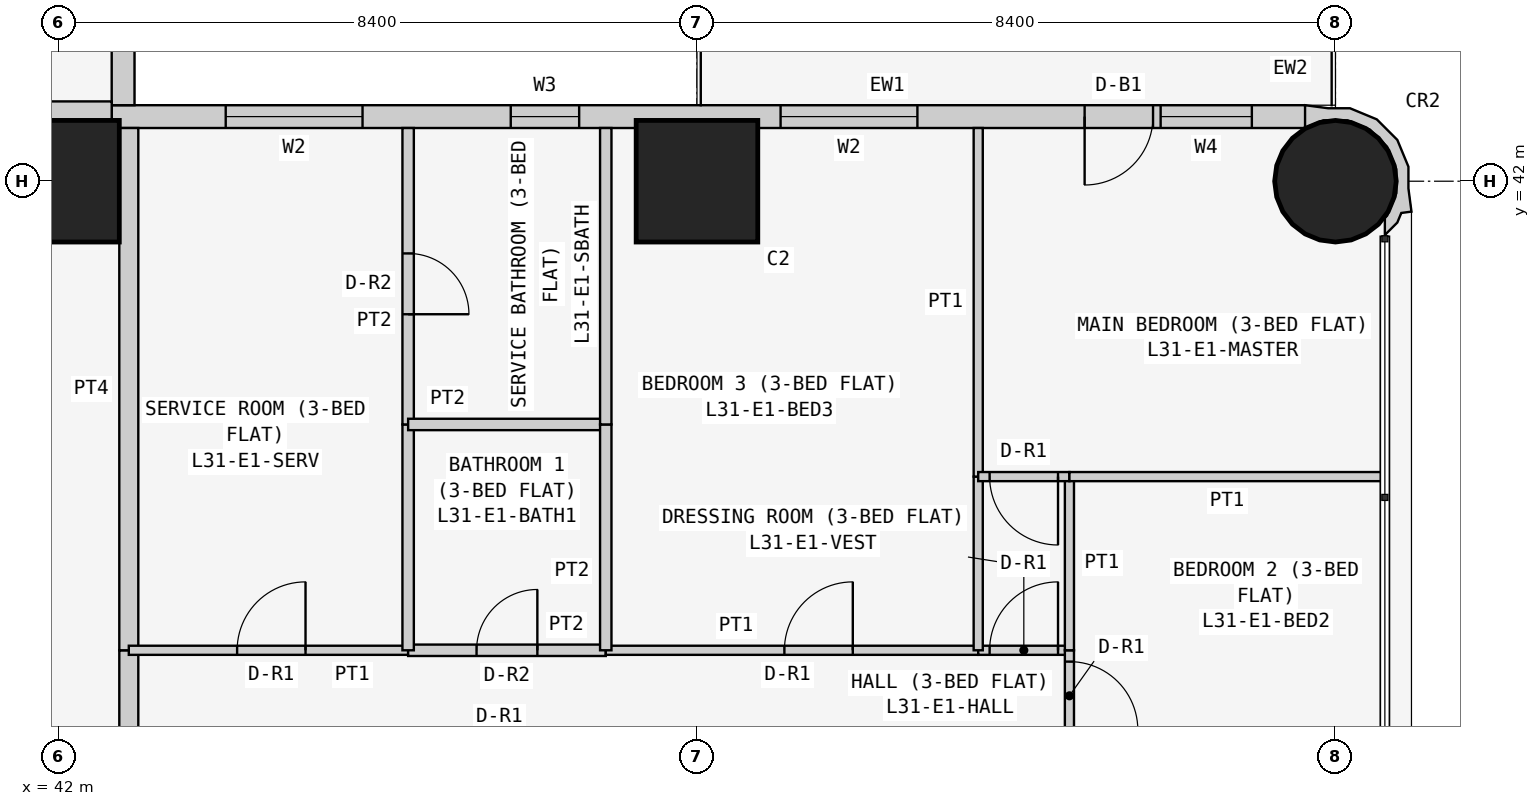
"""IFC4 building model, lengths in metres.
Left out: names, types, materials, properties, quantities, classifications, styles, units other than length and angle.
Written with IfcOpenShell. Run it as: python <this file> out.ifc"""

import sys

from ifc_helpers import new_model, si_unit, direction, frame, frame_2d, origin, origin_2d, place, context, subcontext, project, spatial, polyline, rectangle, circle, outline, extrude, element, fill, save


model = new_model("IFC4")
c1 = context("Model", 3, precision=1e-05, world=origin(), true_north=direction((0.0, 1.0)))
c2 = subcontext(c1, "Body", "Model", "MODEL_VIEW")
j1 = project(units=[si_unit("LENGTHUNIT", "METRE"), si_unit("PLANEANGLEUNIT", "RADIAN")], contexts=[c1])
p1 = place(None, origin())
s1 = spatial("IfcSite", under=j1, at=p1, CompositionType="ELEMENT")
p2 = place(p1, origin())
s2 = spatial("IfcBuilding", under=s1, at=p2, CompositionType="ELEMENT")
p3 = place(p2, frame((0.0, 0.0, 123.3)))
s3 = spatial("IfcBuildingStorey", under=s2, at=p3, CompositionType="ELEMENT", Elevation=123.3)
for number, where, z_axis, x_axis in (
    (1, (42.0, 42.0, 0.0), (0.0, 0.0, 1.0), (1.0, 0.0, 0.0)),
    (2, (50.4, 42.0, 0.0), (0.0, 0.0, 1.0), (1.0, 0.0, 0.0)),
):
    element("IfcColumn", number, at=place(p3, frame(where, z_axis=z_axis, x_axis=x_axis)), inside=s3, PredefinedType="COLUMN", context=c2, shape_type="SweptSolid", body=[
        extrude(rectangle(XDim=1.6, YDim=1.6, at=origin_2d()), origin(), (0.0, 0.0, 1.0), 3.6),
    ])
p4 = place(p3, frame((58.8, 42.0, 0.0), z_axis=(0.0, 0.0, 1.0), x_axis=(1.0, 0.0, 0.0)))
e3 = element("IfcColumn", 3, at=p4, inside=s3, PredefinedType="COLUMN", context=c2, shape_type="SweptSolid", body=[
    extrude(circle(Radius=0.8, at=origin_2d()), origin(), (0.0, 0.0, 1.0), 3.6),
])
p5 = place(p3, frame((58.4, 42.85, 0.0), z_axis=(0.0, 0.0, 1.0), x_axis=(-1.0, 0.0, 0.0)))
e4 = element("IfcWall", 4, at=p5, inside=s3, PredefinedType="SOLIDWALL", context=c2, shape_type="SweptSolid", body=[
    extrude(rectangle(XDim=15.7, YDim=0.3, at=frame_2d((7.85, 0.0))), origin(), (0.0, 0.0, 1.0), 3.45),
])
p6 = place(p5, frame((12.4, 0.0, 0.9)))
e5 = element("IfcOpeningElement", 5, at=p6, cuts=e4, PredefinedType="OPENING", context=c2, shape_type="SweptSolid", body=[
    extrude(rectangle(XDim=1.8, YDim=1.5, at=frame_2d((0.9, 0.75))), frame((0.0, 0.16, 0.0), z_axis=(0.0, -1.0, 0.0), x_axis=(1.0, 0.0, 0.0)), (0.0, 0.0, 1.0), 0.32),
])
p7 = place(p5, frame((9.55, 0.0, 1.5)))
e6 = element("IfcOpeningElement", 6, at=p7, cuts=e4, PredefinedType="OPENING", context=c2, shape_type="SweptSolid", body=[
    extrude(rectangle(XDim=0.9, YDim=0.7, at=frame_2d((0.45, 0.35))), frame((0.0, 0.16, 0.0), z_axis=(0.0, -1.0, 0.0), x_axis=(1.0, 0.0, 0.0)), (0.0, 0.0, 1.0), 0.32),
])
p8 = place(p5, frame((5.1, 0.0, 0.9)))
e7 = element("IfcOpeningElement", 7, at=p8, cuts=e4, PredefinedType="OPENING", context=c2, shape_type="SweptSolid", body=[
    extrude(rectangle(XDim=1.8, YDim=1.5, at=frame_2d((0.9, 0.75))), frame((0.0, 0.16, 0.0), z_axis=(0.0, -1.0, 0.0), x_axis=(1.0, 0.0, 0.0)), (0.0, 0.0, 1.0), 0.32),
])
p9 = place(p5, frame((2.0, 0.0, 0.0)))
e8 = element("IfcOpeningElement", 8, at=p9, cuts=e4, PredefinedType="OPENING", context=c2, shape_type="SweptSolid", body=[
    extrude(rectangle(XDim=0.9, YDim=2.4, at=frame_2d((0.45, 1.2))), frame((0.0, 0.16, 0.0), z_axis=(0.0, -1.0, 0.0), x_axis=(1.0, 0.0, 0.0)), (0.0, 0.0, 1.0), 0.32),
])
p10 = place(p5, frame((0.7, 0.0, 0.9)))
e9 = element("IfcOpeningElement", 9, at=p10, cuts=e4, PredefinedType="OPENING", context=c2, shape_type="SweptSolid", body=[
    extrude(rectangle(XDim=1.2, YDim=1.5, at=frame_2d((0.6, 0.75))), frame((0.0, 0.16, 0.0), z_axis=(0.0, -1.0, 0.0), x_axis=(1.0, 0.0, 0.0)), (0.0, 0.0, 1.0), 0.32),
])
p11 = place(p3, frame((42.85, 43.0, 0.0), z_axis=(0.0, 0.0, 1.0), x_axis=(0.0, 1.0, 0.0)))
e10 = element("IfcWall", 10, at=p11, inside=s3, PredefinedType="SOLIDWALL", context=c2, shape_type="SweptSolid", body=[
    extrude(rectangle(XDim=7.0, YDim=0.3, at=frame_2d((3.5, 0.0))), origin(), (0.0, 0.0, 1.0), 3.45),
])
p12 = place(p11, frame((1.5, 0.0, 0.9)))
e11 = element("IfcOpeningElement", 11, at=p12, cuts=e10, PredefinedType="OPENING", context=c2, shape_type="SweptSolid", body=[
    extrude(rectangle(XDim=2.4, YDim=1.5, at=frame_2d((1.2, 0.75))), frame((0.0, 0.16, 0.0), z_axis=(0.0, -1.0, 0.0), x_axis=(1.0, 0.0, 0.0)), (0.0, 0.0, 1.0), 0.32),
])
p13 = place(p11, frame((5.05, 0.0, 0.9)))
e12 = element("IfcOpeningElement", 12, at=p13, cuts=e10, PredefinedType="OPENING", context=c2, shape_type="SweptSolid", body=[
    extrude(rectangle(XDim=1.2, YDim=1.5, at=frame_2d((0.6, 0.75))), frame((0.0, 0.16, 0.0), z_axis=(0.0, -1.0, 0.0), x_axis=(1.0, 0.0, 0.0)), (0.0, 0.0, 1.0), 0.32),
])
p14 = place(p3, frame((59.395, 41.352, 0.0), z_axis=(0.0, 0.0, 1.0), x_axis=(0.93923434088, 0.343276641956, 0.0)))
e13 = element("IfcWall", 13, at=p14, inside=s3, PredefinedType="SOLIDWALL", context=c2, shape_type="SweptSolid", body=[
    extrude(outline(polyline([(0.532, 0.393), (0.631, 0.663), (0.614, 1.044), (0.453, 1.391), (0.172, 1.649), (-0.097, 1.748), (-0.369, 1.89), (-0.509, 1.621), (-0.491, 1.615), (-0.479, 1.609), (-0.211, 1.62), (0.088, 1.511), (0.323, 1.295), (0.457, 1.006), (0.47, 0.688), (0.361, 0.389), (0.145, 0.154), (0.108, 0.136), (0.031, -0.075), (0.241, 0.023), (0.333, 0.124), (0.465, 0.094), (0.532, 0.393)])), origin(), (0.0, 0.0, 1.0), 3.45),
])
p15 = place(p3, frame((35.829, 42.925, 0.0), z_axis=(0.0, 0.0, 1.0), x_axis=(1.0, 0.0, 0.0)))
e14 = element("IfcWall", 14, at=p15, inside=s3, PredefinedType="PARTITIONING", context=c2, shape_type="SweptSolid", body=[
    extrude(rectangle(XDim=6.871, YDim=0.25, at=frame_2d((3.436, 0.0))), origin(), (0.0, 0.0, 1.0), 3.45),
])
p16 = place(p3, frame((42.925, 35.829, 0.0), z_axis=(0.0, 0.0, 1.0), x_axis=(0.0, -1.0, 0.0)))
e15 = element("IfcWall", 15, at=p16, inside=s3, PredefinedType="PARTITIONING", context=c2, shape_type="SweptSolid", body=[
    extrude(rectangle(XDim=1.2, YDim=0.25, at=frame_2d((0.6, 0.0))), origin(), (0.0, 0.0, 1.0), 3.45),
])
p17 = place(p3, frame((42.925, 42.7, 0.0), z_axis=(0.0, 0.0, 1.0), x_axis=(0.0, -1.0, 0.0)))
e16 = element("IfcWall", 16, at=p17, inside=s3, PredefinedType="PARTITIONING", context=c2, shape_type="SweptSolid", body=[
    extrude(rectangle(XDim=6.871, YDim=0.25, at=frame_2d((3.436, 0.0))), origin(), (0.0, 0.0, 1.0), 3.45),
])
p18 = place(p3, frame((46.6, 35.829, 0.0), z_axis=(0.0, 0.0, 1.0), x_axis=(-1.0, 0.0, 0.0)))
e17 = element("IfcWall", 17, at=p18, inside=s3, PredefinedType="PARTITIONING", context=c2, shape_type="SweptSolid", body=[
    extrude(rectangle(XDim=3.675, YDim=0.12, at=frame_2d((1.837, 0.0))), origin(), (0.0, 0.0, 1.0), 3.45),
])
p19 = place(p18, frame((1.35, 0.0, 0.0)))
e18 = element("IfcOpeningElement", 18, at=p19, cuts=e17, PredefinedType="OPENING", context=c2, shape_type="SweptSolid", body=[
    extrude(rectangle(XDim=0.9, YDim=2.1, at=frame_2d((0.45, 1.05))), frame((0.0, 0.07, 0.0), z_axis=(0.0, -1.0, 0.0), x_axis=(1.0, 0.0, 0.0)), (0.0, 0.0, 1.0), 0.14),
])
p20 = place(p3, frame((49.2, 35.829, 0.0), z_axis=(0.0, 0.0, 1.0), x_axis=(-1.0, 0.0, 0.0)))
e19 = element("IfcWall", 19, at=p20, inside=s3, PredefinedType="PARTITIONING", context=c2, shape_type="SweptSolid", body=[
    extrude(rectangle(XDim=2.6, YDim=0.15, at=frame_2d((1.3, 0.0))), origin(), (0.0, 0.0, 1.0), 3.45),
])
p21 = place(p20, frame((0.9, 0.0, 0.0)))
e20 = element("IfcOpeningElement", 20, at=p21, cuts=e19, PredefinedType="OPENING", context=c2, shape_type="SweptSolid", body=[
    extrude(rectangle(XDim=0.8, YDim=2.1, at=frame_2d((0.4, 1.05))), frame((0.0, 0.085, 0.0), z_axis=(0.0, -1.0, 0.0), x_axis=(1.0, 0.0, 0.0)), (0.0, 0.0, 1.0), 0.17),
])
p22 = place(p3, frame((54.1, 35.829, 0.0), z_axis=(0.0, 0.0, 1.0), x_axis=(-1.0, 0.0, 0.0)))
e21 = element("IfcWall", 21, at=p22, inside=s3, PredefinedType="PARTITIONING", context=c2, shape_type="SweptSolid", body=[
    extrude(rectangle(XDim=4.9, YDim=0.12, at=frame_2d((2.45, 0.0))), origin(), (0.0, 0.0, 1.0), 3.45),
])
p23 = place(p22, frame((1.65, 0.0, 0.0)))
e22 = element("IfcOpeningElement", 22, at=p23, cuts=e21, PredefinedType="OPENING", context=c2, shape_type="SweptSolid", body=[
    extrude(rectangle(XDim=0.9, YDim=2.1, at=frame_2d((0.45, 1.05))), frame((0.0, 0.07, 0.0), z_axis=(0.0, -1.0, 0.0), x_axis=(1.0, 0.0, 0.0)), (0.0, 0.0, 1.0), 0.14),
])
p24 = place(p3, frame((55.3, 35.829, 0.0), z_axis=(0.0, 0.0, 1.0), x_axis=(-1.0, 0.0, 0.0)))
e23 = element("IfcWall", 23, at=p24, inside=s3, PredefinedType="PARTITIONING", context=c2, shape_type="SweptSolid", body=[
    extrude(rectangle(XDim=1.2, YDim=0.12, at=frame_2d((0.6, 0.0))), origin(), (0.0, 0.0, 1.0), 3.45),
])
p25 = place(p24, frame((0.15, 0.0, 0.0)))
e24 = element("IfcOpeningElement", 24, at=p25, cuts=e23, PredefinedType="OPENING", context=c2, shape_type="SweptSolid", body=[
    extrude(rectangle(XDim=0.9, YDim=2.1, at=frame_2d((0.45, 1.05))), frame((0.0, 0.07, 0.0), z_axis=(0.0, -1.0, 0.0), x_axis=(1.0, 0.0, 0.0)), (0.0, 0.0, 1.0), 0.14),
])
p26 = place(p3, frame((55.3, 34.629, 0.0), z_axis=(0.0, 0.0, 1.0), x_axis=(0.0, 1.0, 0.0)))
e25 = element("IfcWall", 25, at=p26, inside=s3, PredefinedType="PARTITIONING", context=c2, shape_type="SweptSolid", body=[
    extrude(rectangle(XDim=1.2, YDim=0.12, at=frame_2d((0.6, 0.0))), origin(), (0.0, 0.0, 1.0), 3.45),
])
p27 = place(p26, frame((0.151, 0.0, 0.0)))
e26 = element("IfcOpeningElement", 26, at=p27, cuts=e25, PredefinedType="OPENING", context=c2, shape_type="SweptSolid", body=[
    extrude(rectangle(XDim=0.9, YDim=2.1, at=frame_2d((0.45, 1.05))), frame((0.0, 0.07, 0.0), z_axis=(0.0, -1.0, 0.0), x_axis=(1.0, 0.0, 0.0)), (0.0, 0.0, 1.0), 0.14),
])
p28 = place(p3, frame((46.6, 35.829, 0.0), z_axis=(0.0, 0.0, 1.0), x_axis=(0.0, 1.0, 0.0)))
e27 = element("IfcWall", 27, at=p28, inside=s3, PredefinedType="PARTITIONING", context=c2, shape_type="SweptSolid", body=[
    extrude(rectangle(XDim=2.971, YDim=0.15, at=frame_2d((1.485, 0.0))), origin(), (0.0, 0.0, 1.0), 3.45),
])
p29 = place(p3, frame((46.6, 38.8, 0.0), z_axis=(0.0, 0.0, 1.0), x_axis=(0.0, 1.0, 0.0)))
e28 = element("IfcWall", 28, at=p29, inside=s3, PredefinedType="PARTITIONING", context=c2, shape_type="SweptSolid", body=[
    extrude(rectangle(XDim=3.9, YDim=0.15, at=frame_2d((1.95, 0.0))), origin(), (0.0, 0.0, 1.0), 3.45),
])
p30 = place(p29, frame((1.45, 0.0, 0.0)))
e29 = element("IfcOpeningElement", 29, at=p30, cuts=e28, PredefinedType="OPENING", context=c2, shape_type="SweptSolid", body=[
    extrude(rectangle(XDim=0.8, YDim=2.1, at=frame_2d((0.4, 1.05))), frame((0.0, 0.085, 0.0), z_axis=(0.0, -1.0, 0.0), x_axis=(1.0, 0.0, 0.0)), (0.0, 0.0, 1.0), 0.17),
])
p31 = place(p3, frame((49.2, 38.8, 0.0), z_axis=(0.0, 0.0, 1.0), x_axis=(-1.0, 0.0, 0.0)))
e30 = element("IfcWall", 30, at=p31, inside=s3, PredefinedType="PARTITIONING", context=c2, shape_type="SweptSolid", body=[
    extrude(rectangle(XDim=2.6, YDim=0.15, at=frame_2d((1.3, 0.0))), origin(), (0.0, 0.0, 1.0), 3.45),
])
p32 = place(p3, frame((49.2, 35.829, 0.0), z_axis=(0.0, 0.0, 1.0), x_axis=(0.0, 1.0, 0.0)))
e31 = element("IfcWall", 31, at=p32, inside=s3, PredefinedType="PARTITIONING", context=c2, shape_type="SweptSolid", body=[
    extrude(rectangle(XDim=2.971, YDim=0.15, at=frame_2d((1.485, 0.0))), origin(), (0.0, 0.0, 1.0), 3.45),
])
p33 = place(p3, frame((49.2, 38.8, 0.0), z_axis=(0.0, 0.0, 1.0), x_axis=(0.0, 1.0, 0.0)))
e32 = element("IfcWall", 32, at=p33, inside=s3, PredefinedType="PARTITIONING", context=c2, shape_type="SweptSolid", body=[
    extrude(rectangle(XDim=3.9, YDim=0.15, at=frame_2d((1.95, 0.0))), origin(), (0.0, 0.0, 1.0), 3.45),
])
p34 = place(p3, frame((54.1, 35.829, 0.0), z_axis=(0.0, 0.0, 1.0), x_axis=(0.0, 1.0, 0.0)))
e33 = element("IfcWall", 33, at=p34, inside=s3, PredefinedType="PARTITIONING", context=c2, shape_type="SweptSolid", body=[
    extrude(rectangle(XDim=2.285, YDim=0.12, at=frame_2d((1.143, 0.0))), origin(), (0.0, 0.0, 1.0), 3.45),
])
p35 = place(p3, frame((54.1, 38.114, 0.0), z_axis=(0.0, 0.0, 1.0), x_axis=(0.0, 1.0, 0.0)))
e34 = element("IfcWall", 34, at=p35, inside=s3, PredefinedType="PARTITIONING", context=c2, shape_type="SweptSolid", body=[
    extrude(rectangle(XDim=4.586, YDim=0.12, at=frame_2d((2.293, 0.0))), origin(), (0.0, 0.0, 1.0), 3.45),
])
p36 = place(p3, frame((55.3, 35.829, 0.0), z_axis=(0.0, 0.0, 1.0), x_axis=(0.0, 1.0, 0.0)))
e35 = element("IfcWall", 35, at=p36, inside=s3, PredefinedType="PARTITIONING", context=c2, shape_type="SweptSolid", body=[
    extrude(rectangle(XDim=2.285, YDim=0.12, at=frame_2d((1.143, 0.0))), origin(), (0.0, 0.0, 1.0), 3.45),
])
p37 = place(p3, frame((55.3, 38.114, 0.0), z_axis=(0.0, 0.0, 1.0), x_axis=(-1.0, 0.0, 0.0)))
e36 = element("IfcWall", 36, at=p37, inside=s3, PredefinedType="PARTITIONING", context=c2, shape_type="SweptSolid", body=[
    extrude(rectangle(XDim=1.2, YDim=0.12, at=frame_2d((0.6, 0.0))), origin(), (0.0, 0.0, 1.0), 3.45),
])
p38 = place(p37, frame((0.15, 0.0, 0.0)))
e37 = element("IfcOpeningElement", 37, at=p38, cuts=e36, PredefinedType="OPENING", context=c2, shape_type="SweptSolid", body=[
    extrude(rectangle(XDim=0.9, YDim=2.1, at=frame_2d((0.45, 1.05))), frame((0.0, 0.07, 0.0), z_axis=(0.0, -1.0, 0.0), x_axis=(1.0, 0.0, 0.0)), (0.0, 0.0, 1.0), 0.14),
])
p39 = place(p3, frame((59.45, 38.114, 0.0), z_axis=(0.0, 0.0, 1.0), x_axis=(-1.0, 0.0, 0.0)))
e38 = element("IfcWall", 38, at=p39, inside=s3, PredefinedType="PARTITIONING", context=c2, shape_type="SweptSolid", body=[
    extrude(rectangle(XDim=4.15, YDim=0.12, at=frame_2d((2.075, 0.0))), origin(), (0.0, 0.0, 1.0), 3.45),
])
p40 = place(p6, origin())
e39 = element("IfcWindow", 39, at=p40, inside=s3, PartitioningType="SINGLE_PANEL", PredefinedType="WINDOW", context=c2, shape_type="SweptSolid", body=[
    extrude(rectangle(XDim=1.8, YDim=1.5, at=frame_2d((0.9, 0.75))), frame((0.0, 0.03, 0.0), z_axis=(0.0, -1.0, 0.0), x_axis=(1.0, 0.0, 0.0)), (0.0, 0.0, 1.0), 0.06),
])
fill(e5, e39)
p41 = place(p7, origin())
e40 = element("IfcWindow", 40, at=p41, inside=s3, PartitioningType="SINGLE_PANEL", PredefinedType="WINDOW", context=c2, shape_type="SweptSolid", body=[
    extrude(rectangle(XDim=0.9, YDim=0.7, at=frame_2d((0.45, 0.35))), frame((0.0, 0.03, 0.0), z_axis=(0.0, -1.0, 0.0), x_axis=(1.0, 0.0, 0.0)), (0.0, 0.0, 1.0), 0.06),
])
fill(e6, e40)
p42 = place(p8, origin())
e41 = element("IfcWindow", 41, at=p42, inside=s3, PartitioningType="SINGLE_PANEL", PredefinedType="WINDOW", context=c2, shape_type="SweptSolid", body=[
    extrude(rectangle(XDim=1.8, YDim=1.5, at=frame_2d((0.9, 0.75))), frame((0.0, 0.03, 0.0), z_axis=(0.0, -1.0, 0.0), x_axis=(1.0, 0.0, 0.0)), (0.0, 0.0, 1.0), 0.06),
])
fill(e7, e41)
p43 = place(p9, origin())
e42 = element("IfcDoor", 42, at=p43, inside=s3, OperationType="SINGLE_SWING_RIGHT", PredefinedType="DOOR", context=c2, shape_type="SweptSolid", body=[
    extrude(rectangle(XDim=0.9, YDim=2.4, at=frame_2d((0.45, 1.2))), frame((0.0, 0.025, 0.0), z_axis=(0.0, -1.0, 0.0), x_axis=(1.0, 0.0, 0.0)), (0.0, 0.0, 1.0), 0.05),
])
fill(e8, e42)
p44 = place(p10, origin())
e43 = element("IfcWindow", 43, at=p44, inside=s3, PartitioningType="SINGLE_PANEL", PredefinedType="WINDOW", context=c2, shape_type="SweptSolid", body=[
    extrude(rectangle(XDim=1.2, YDim=1.5, at=frame_2d((0.6, 0.75))), frame((0.0, 0.03, 0.0), z_axis=(0.0, -1.0, 0.0), x_axis=(1.0, 0.0, 0.0)), (0.0, 0.0, 1.0), 0.06),
])
fill(e9, e43)
p45 = place(p19, frame((0.9, 0.0, 0.0), z_axis=(0.0, 0.0, 1.0), x_axis=(-1.0, 0.0, 0.0)))
e44 = element("IfcDoor", 44, at=p45, inside=s3, OperationType="SINGLE_SWING_RIGHT", PredefinedType="DOOR", context=c2, shape_type="SweptSolid", body=[
    extrude(rectangle(XDim=0.9, YDim=2.1, at=frame_2d((0.45, 1.05))), frame((0.0, 0.025, 0.0), z_axis=(0.0, -1.0, 0.0), x_axis=(1.0, 0.0, 0.0)), (0.0, 0.0, 1.0), 0.05),
])
fill(e18, e44)
p46 = place(p30, frame((0.8, 0.0, 0.0), z_axis=(0.0, 0.0, 1.0), x_axis=(-1.0, 0.0, 0.0)))
e45 = element("IfcDoor", 45, at=p46, inside=s3, OperationType="SINGLE_SWING_RIGHT", PredefinedType="DOOR", context=c2, shape_type="SweptSolid", body=[
    extrude(rectangle(XDim=0.8, YDim=2.1, at=frame_2d((0.4, 1.05))), frame((0.0, 0.025, 0.0), z_axis=(0.0, -1.0, 0.0), x_axis=(1.0, 0.0, 0.0)), (0.0, 0.0, 1.0), 0.05),
])
fill(e29, e45)
p47 = place(p21, frame((0.8, 0.0, 0.0), z_axis=(0.0, 0.0, 1.0), x_axis=(-1.0, 0.0, 0.0)))
e46 = element("IfcDoor", 46, at=p47, inside=s3, OperationType="SINGLE_SWING_RIGHT", PredefinedType="DOOR", context=c2, shape_type="SweptSolid", body=[
    extrude(rectangle(XDim=0.8, YDim=2.1, at=frame_2d((0.4, 1.05))), frame((0.0, 0.025, 0.0), z_axis=(0.0, -1.0, 0.0), x_axis=(1.0, 0.0, 0.0)), (0.0, 0.0, 1.0), 0.05),
])
fill(e20, e46)
p48 = place(p23, frame((0.9, 0.0, 0.0), z_axis=(0.0, 0.0, 1.0), x_axis=(-1.0, 0.0, 0.0)))
e47 = element("IfcDoor", 47, at=p48, inside=s3, OperationType="SINGLE_SWING_RIGHT", PredefinedType="DOOR", context=c2, shape_type="SweptSolid", body=[
    extrude(rectangle(XDim=0.9, YDim=2.1, at=frame_2d((0.45, 1.05))), frame((0.0, 0.025, 0.0), z_axis=(0.0, -1.0, 0.0), x_axis=(1.0, 0.0, 0.0)), (0.0, 0.0, 1.0), 0.05),
])
fill(e22, e47)
p49 = place(p25, frame((0.9, 0.0, 0.0), z_axis=(0.0, 0.0, 1.0), x_axis=(-1.0, 0.0, 0.0)))
e48 = element("IfcDoor", 48, at=p49, inside=s3, OperationType="SINGLE_SWING_RIGHT", PredefinedType="DOOR", context=c2, shape_type="SweptSolid", body=[
    extrude(rectangle(XDim=0.9, YDim=2.1, at=frame_2d((0.45, 1.05))), frame((0.0, 0.025, 0.0), z_axis=(0.0, -1.0, 0.0), x_axis=(1.0, 0.0, 0.0)), (0.0, 0.0, 1.0), 0.05),
])
fill(e24, e48)
p50 = place(p38, origin())
e49 = element("IfcDoor", 49, at=p50, inside=s3, OperationType="SINGLE_SWING_LEFT", PredefinedType="DOOR", context=c2, shape_type="SweptSolid", body=[
    extrude(rectangle(XDim=0.9, YDim=2.1, at=frame_2d((0.45, 1.05))), frame((0.0, 0.025, 0.0), z_axis=(0.0, -1.0, 0.0), x_axis=(1.0, 0.0, 0.0)), (0.0, 0.0, 1.0), 0.05),
])
fill(e37, e49)
p51 = place(p27, frame((0.9, 0.0, 0.0), z_axis=(0.0, 0.0, 1.0), x_axis=(-1.0, 0.0, 0.0)))
e50 = element("IfcDoor", 50, at=p51, inside=s3, OperationType="SINGLE_SWING_RIGHT", PredefinedType="DOOR", context=c2, shape_type="SweptSolid", body=[
    extrude(rectangle(XDim=0.9, YDim=2.1, at=frame_2d((0.45, 1.05))), frame((0.0, 0.025, 0.0), z_axis=(0.0, -1.0, 0.0), x_axis=(1.0, 0.0, 0.0)), (0.0, 0.0, 1.0), 0.05),
])
fill(e26, e50)
save(model, sys.argv[1])
